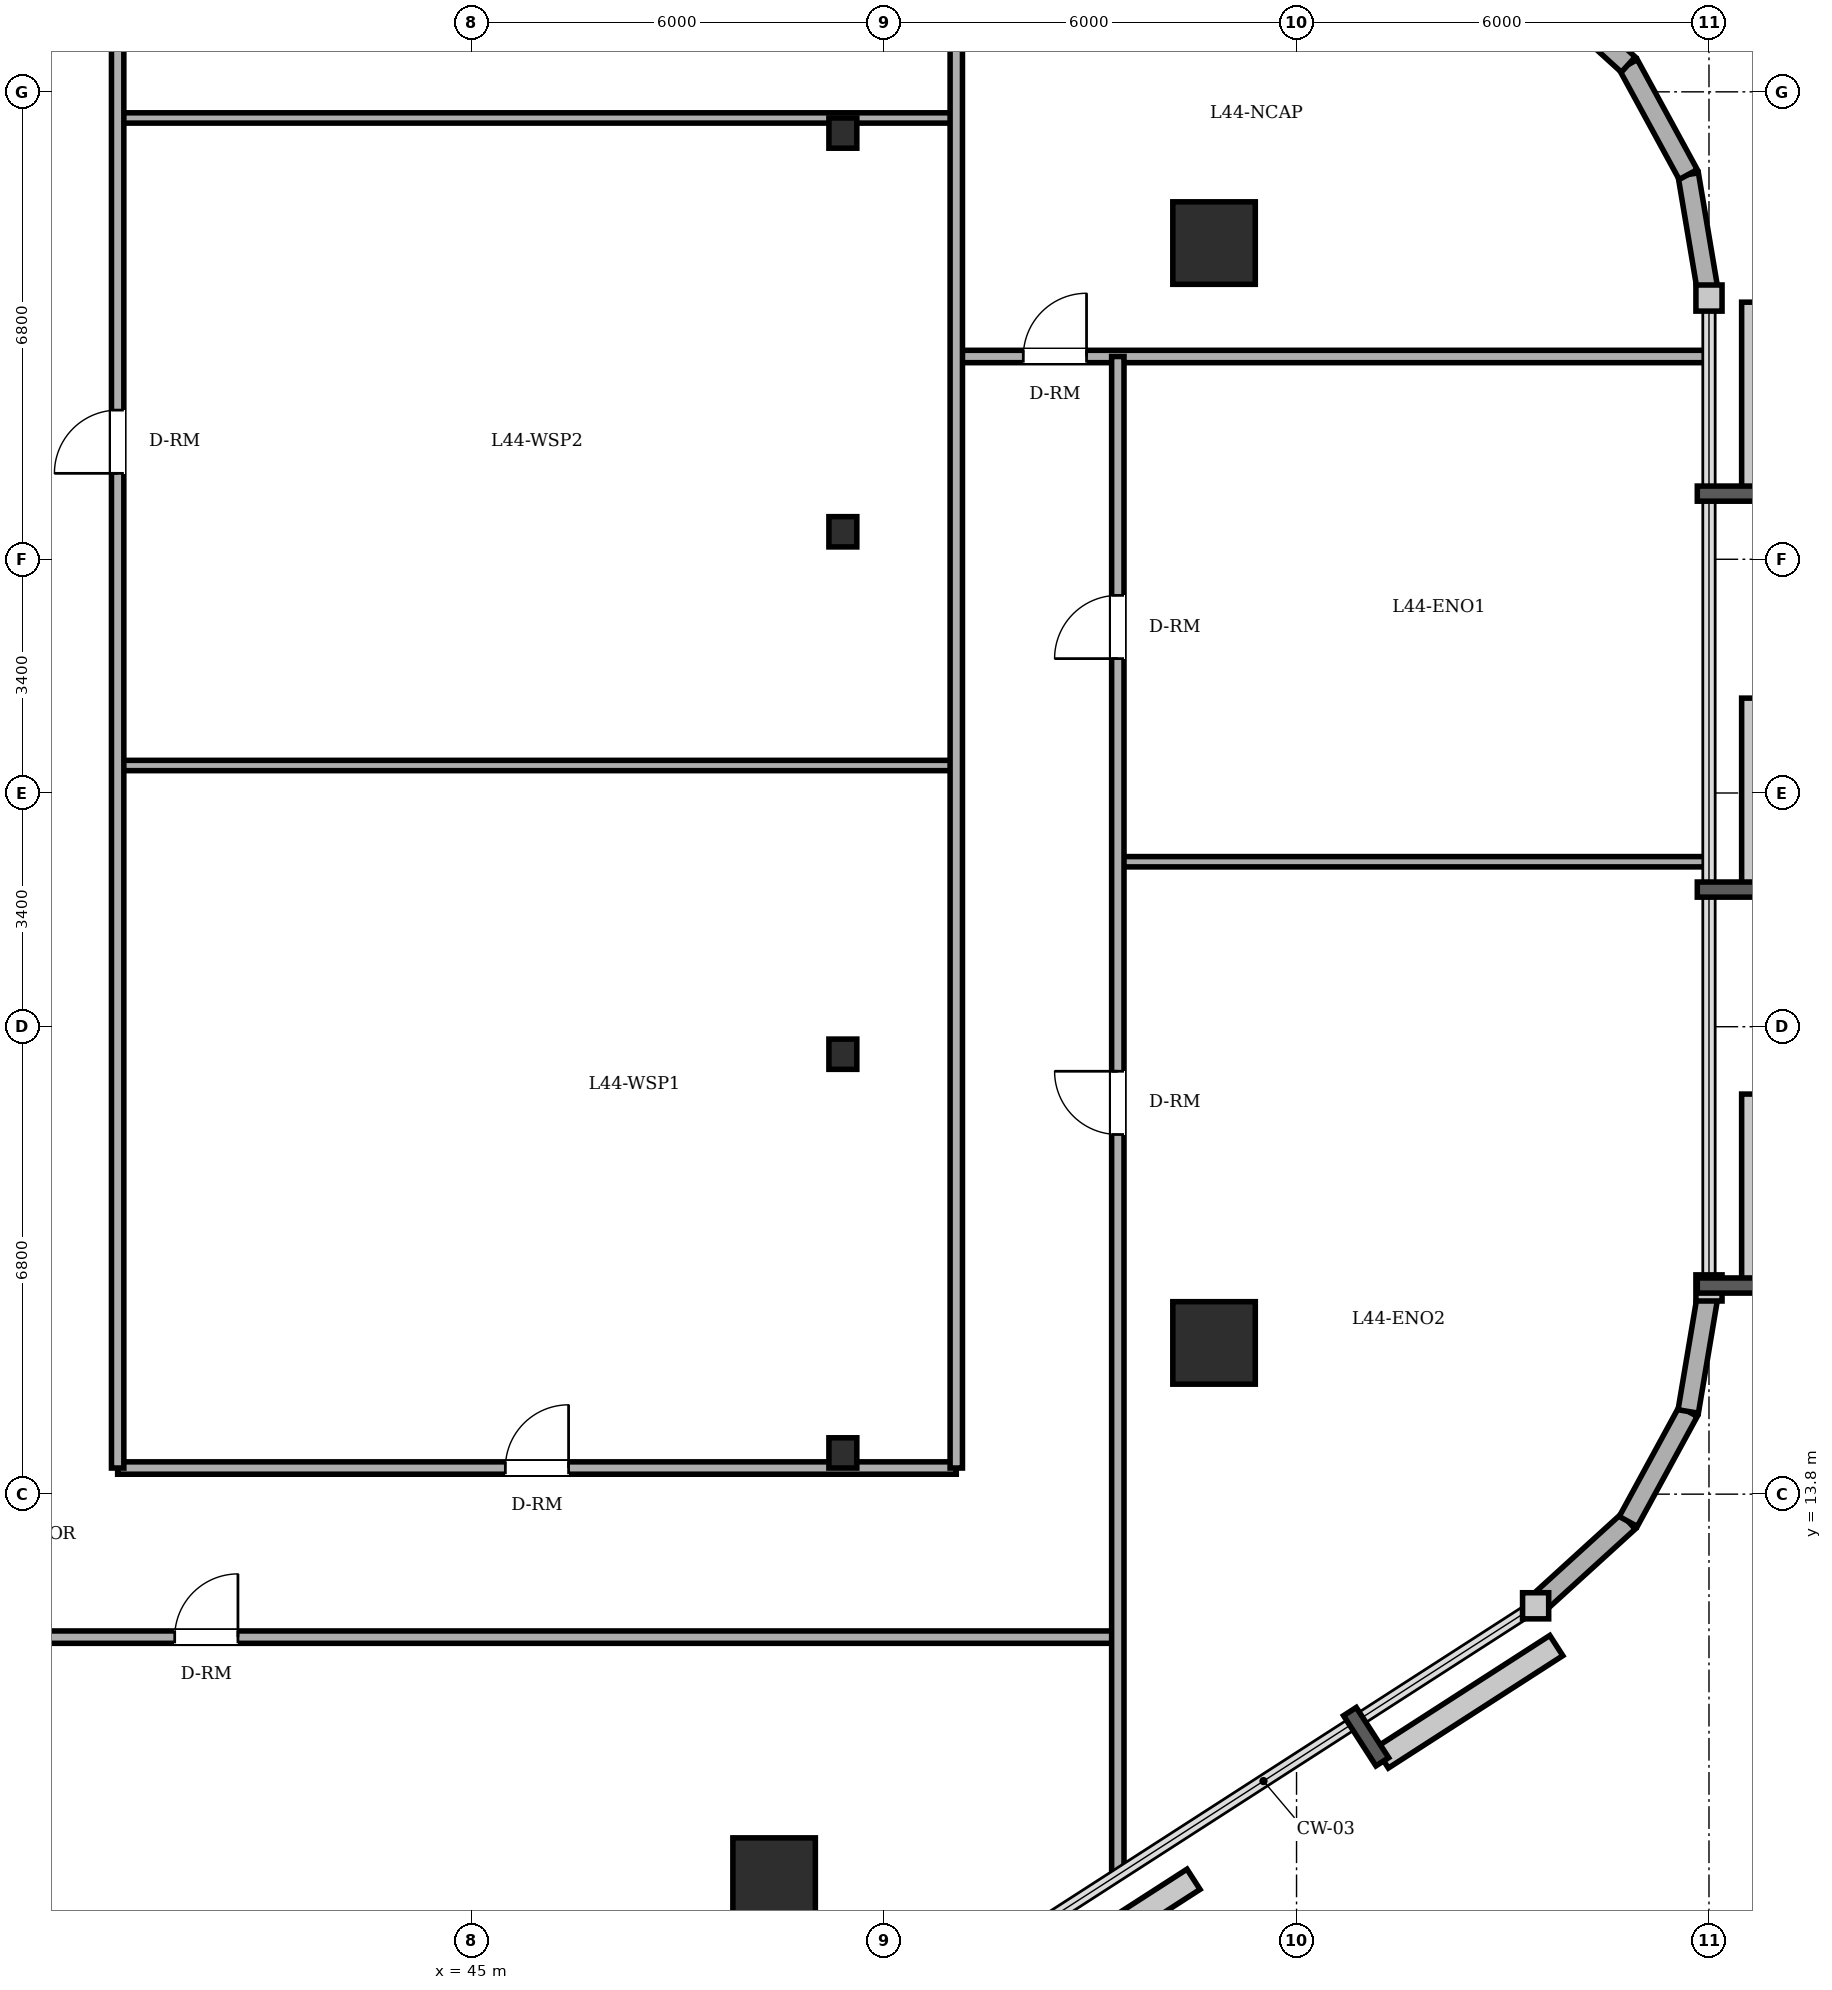
"""IFC4 building model, lengths in metres.
Left out: names, types, materials, properties, quantities, classifications, styles, units other than length and angle.
Written with IfcOpenShell. Run it as: python <this file> out.ifc"""

import sys

from ifc_helpers import new_model, si_unit, direction, frame, frame_2d, origin, origin_2d, place, context, subcontext, project, spatial, rectangle, circle, i_section, extrude, element, fill, save


model = new_model("IFC4")
c1 = context("Model", 3, precision=1e-05, world=origin(), true_north=direction((0.0, 1.0)))
c2 = subcontext(c1, "Body", "Model", "MODEL_VIEW")
j1 = project(units=[si_unit("LENGTHUNIT", "METRE"), si_unit("PLANEANGLEUNIT", "RADIAN")], contexts=[c1])
p1 = place(None, origin())
s1 = spatial("IfcSite", under=j1, at=p1, CompositionType="ELEMENT")
p2 = place(p1, origin())
s2 = spatial("IfcBuilding", under=s1, at=p2, CompositionType="ELEMENT")
p3 = place(p2, frame((0.0, 0.0, 169.0)))
s3 = spatial("IfcBuildingStorey", under=s2, at=p3, CompositionType="ELEMENT", Elevation=169.0)
for number, where, z_axis, x_axis in (
    (1, (49.4, 8.2, 0.0), (0.0, 0.0, 1.0), (1.0, 0.0, 0.0)),
    (2, (55.8, 16.0, 0.0), (0.0, 0.0, 1.0), (1.0, 0.0, 0.0)),
    (3, (55.8, 32.0, 0.0), (0.0, 0.0, 1.0), (1.0, 0.0, 0.0)),
):
    element("IfcColumn", number, at=place(p3, frame(where, z_axis=z_axis, x_axis=x_axis)), inside=s3, PredefinedType="COLUMN", context=c2, shape_type="SweptSolid", body=[
        extrude(circle(Radius=0.6, at=origin_2d()), origin(), (0.0, 0.0, 1.0), 3.6),
    ])
for number, where, z_axis, x_axis in (
    (4, (50.4, 14.4, 0.0), (0.0, 0.0, 1.0), (1.0, 0.0, 0.0)),
    (5, (50.4, 20.2, 0.0), (0.0, 0.0, 1.0), (1.0, 0.0, 0.0)),
    (6, (50.4, 27.8, 0.0), (0.0, 0.0, 1.0), (1.0, 0.0, 0.0)),
    (7, (50.4, 33.6, 0.0), (0.0, 0.0, 1.0), (1.0, 0.0, 0.0)),
):
    element("IfcColumn", number, at=place(p3, frame(where, z_axis=z_axis, x_axis=x_axis)), inside=s3, PredefinedType="COLUMN", context=c2, shape_type="SweptSolid", body=[
        extrude(i_section(OverallWidth=0.406, OverallDepth=0.44, WebThickness=0.024, FlangeThickness=0.039, FilletRadius=0.015, at=origin_2d()), origin(), (0.0, 0.0, 1.0), 3.6),
    ])
p4 = place(p3, frame((60.478, 12.176, 0.0), z_axis=(0.0, 0.0, 1.0), x_axis=(0.73947929393, 0.673179302897, 0.0)))
e8 = element("IfcWall", 8, at=p4, inside=s3, PredefinedType="SOLIDWALL", context=c2, shape_type="SweptSolid", body=[
    extrude(rectangle(XDim=1.823, YDim=0.3, at=frame_2d((0.911, 0.0))), origin(), (0.0, 0.0, 1.0), 3.4),
])
p5 = place(p3, frame((61.826, 13.403, 0.0), z_axis=(0.0, 0.0, 1.0), x_axis=(0.478608030646, 0.878028674362, 0.0)))
e9 = element("IfcWall", 9, at=p5, inside=s3, PredefinedType="SOLIDWALL", context=c2, shape_type="SweptSolid", body=[
    extrude(rectangle(XDim=1.822, YDim=0.3, at=frame_2d((0.911, 0.0))), origin(), (0.0, 0.0, 1.0), 3.4),
])
for number, where, z_axis, x_axis in (
    (10, (62.698, 15.003, 0.0), (0.0, 0.0, 1.0), (0.166, 0.986, 0.0)),
    (11, (63.0, 31.2, 0.0), (0.0, 0.0, 1.0), (-0.166, 0.986, 0.0)),
):
    element("IfcWall", number, at=place(p3, frame(where, z_axis=z_axis, x_axis=x_axis)), inside=s3, PredefinedType="SOLIDWALL", context=c2, shape_type="SweptSolid", body=[
        extrude(rectangle(XDim=1.822, YDim=0.3, at=frame_2d((0.911, 0.0))), origin(), (0.0, 0.0, 1.0), 3.4),
    ])
p6 = place(p3, frame((62.698, 32.997, 0.0), z_axis=(0.0, 0.0, 1.0), x_axis=(-0.478608030646, 0.878028674362, 0.0)))
e12 = element("IfcWall", 12, at=p6, inside=s3, PredefinedType="SOLIDWALL", context=c2, shape_type="SweptSolid", body=[
    extrude(rectangle(XDim=1.822, YDim=0.3, at=frame_2d((0.911, 0.0))), origin(), (0.0, 0.0, 1.0), 3.4),
])
p7 = place(p3, frame((61.826, 34.597, 0.0), z_axis=(0.0, 0.0, 1.0), x_axis=(-0.73947929393, 0.673179302897, 0.0)))
e13 = element("IfcWall", 13, at=p7, inside=s3, PredefinedType="SOLIDWALL", context=c2, shape_type="SweptSolid", body=[
    extrude(rectangle(XDim=1.823, YDim=0.3, at=frame_2d((0.911, 0.0))), origin(), (0.0, 0.0, 1.0), 3.4),
])
p8 = place(p3, frame((13.8, 11.72, 0.0), z_axis=(0.0, 0.0, 1.0), x_axis=(1.0, 0.0, 0.0)))
e14 = element("IfcWall", 14, at=p8, inside=s3, PredefinedType="PARTITIONING", context=c2, shape_type="SweptSolid", body=[
    extrude(rectangle(XDim=40.6, YDim=0.18, at=frame_2d((20.3, 0.0))), origin(), (0.0, 0.0, 1.0), 3.4),
])
p9 = place(p8, frame((12.24, 0.0, 0.0)))
e15 = element("IfcOpeningElement", 15, at=p9, cuts=e14, PredefinedType="OPENING", context=c2, shape_type="SweptSolid", body=[
    extrude(rectangle(XDim=0.92, YDim=2.1, at=frame_2d((0.46, 1.05))), frame((0.0, 0.1, 0.0), z_axis=(0.0, -1.0, 0.0), x_axis=(1.0, 0.0, 0.0)), (0.0, 0.0, 1.0), 0.2),
])
p10 = place(p8, frame((5.54, 0.0, 0.0)))
e16 = element("IfcOpeningElement", 16, at=p10, cuts=e14, PredefinedType="OPENING", context=c2, shape_type="SweptSolid", body=[
    extrude(rectangle(XDim=0.92, YDim=2.1, at=frame_2d((0.46, 1.05))), frame((0.0, 0.1, 0.0), z_axis=(0.0, -1.0, 0.0), x_axis=(1.0, 0.0, 0.0)), (0.0, 0.0, 1.0), 0.2),
])
p11 = place(p8, frame((26.88, 0.0, 0.0)))
e17 = element("IfcOpeningElement", 17, at=p11, cuts=e14, PredefinedType="OPENING", context=c2, shape_type="SweptSolid", body=[
    extrude(rectangle(XDim=0.92, YDim=2.1, at=frame_2d((0.46, 1.05))), frame((0.0, 0.1, 0.0), z_axis=(0.0, -1.0, 0.0), x_axis=(1.0, 0.0, 0.0)), (0.0, 0.0, 1.0), 0.2),
])
p12 = place(p3, frame((39.85, 14.18, 0.0), z_axis=(0.0, 0.0, 1.0), x_axis=(1.0, 0.0, 0.0)))
e18 = element("IfcWall", 18, at=p12, inside=s3, PredefinedType="PARTITIONING", context=c2, shape_type="SweptSolid", body=[
    extrude(rectangle(XDim=12.2, YDim=0.18, at=frame_2d((6.1, 0.0))), origin(), (0.0, 0.0, 1.0), 2.932),
])
p13 = place(p12, frame((5.64, 0.0, 0.0)))
e19 = element("IfcOpeningElement", 19, at=p13, cuts=e18, PredefinedType="OPENING", context=c2, shape_type="SweptSolid", body=[
    extrude(rectangle(XDim=0.92, YDim=2.1, at=frame_2d((0.46, 1.05))), frame((0.0, 0.1, 0.0), z_axis=(0.0, -1.0, 0.0), x_axis=(1.0, 0.0, 0.0)), (0.0, 0.0, 1.0), 0.2),
])
p14 = place(p3, frame((54.4, 23.0, 0.0), z_axis=(0.0, 0.0, 1.0), x_axis=(1.0, 0.0, 0.0)))
e20 = element("IfcWall", 20, at=p14, inside=s3, PredefinedType="PARTITIONING", context=c2, shape_type="SweptSolid", body=[
    extrude(rectangle(XDim=8.6, YDim=0.15, at=frame_2d((4.3, 0.0))), origin(), (0.0, 0.0, 1.0), 3.4),
])
p15 = place(p3, frame((39.85, 24.4, 0.0), z_axis=(0.0, 0.0, 1.0), x_axis=(1.0, 0.0, 0.0)))
e21 = element("IfcWall", 21, at=p15, inside=s3, PredefinedType="PARTITIONING", context=c2, shape_type="SweptSolid", body=[
    extrude(rectangle(XDim=12.2, YDim=0.15, at=frame_2d((6.1, 0.0))), origin(), (0.0, 0.0, 1.0), 3.4),
])
p16 = place(p3, frame((52.05, 30.35, 0.0), z_axis=(0.0, 0.0, 1.0), x_axis=(1.0, 0.0, 0.0)))
e22 = element("IfcWall", 22, at=p16, inside=s3, PredefinedType="PARTITIONING", context=c2, shape_type="SweptSolid", body=[
    extrude(rectangle(XDim=10.95, YDim=0.18, at=frame_2d((5.475, 0.0))), origin(), (0.0, 0.0, 1.0), 3.4),
])
p17 = place(p16, frame((0.975, 0.0, 0.0)))
e23 = element("IfcOpeningElement", 23, at=p17, cuts=e22, PredefinedType="OPENING", context=c2, shape_type="SweptSolid", body=[
    extrude(rectangle(XDim=0.92, YDim=2.1, at=frame_2d((0.46, 1.05))), frame((0.0, 0.1, 0.0), z_axis=(0.0, -1.0, 0.0), x_axis=(1.0, 0.0, 0.0)), (0.0, 0.0, 1.0), 0.2),
])
p18 = place(p3, frame((39.85, 33.82, 0.0), z_axis=(0.0, 0.0, 1.0), x_axis=(1.0, 0.0, 0.0)))
e24 = element("IfcWall", 24, at=p18, inside=s3, PredefinedType="PARTITIONING", context=c2, shape_type="SweptSolid", body=[
    extrude(rectangle(XDim=12.2, YDim=0.15, at=frame_2d((6.1, 0.0))), origin(), (0.0, 0.0, 1.0), 2.932),
])
p19 = place(p3, frame((39.85, 14.18, 0.0), z_axis=(0.0, 0.0, 1.0), x_axis=(0.0, 1.0, 0.0)))
e25 = element("IfcWall", 25, at=p19, inside=s3, PredefinedType="PARTITIONING", context=c2, shape_type="SweptSolid", body=[
    extrude(rectangle(XDim=27.62, YDim=0.18, at=frame_2d((13.81, 0.0))), origin(), (0.0, 0.0, 1.0), 3.4),
])
p20 = place(p19, frame((14.47, 0.0, 0.0)))
e26 = element("IfcOpeningElement", 26, at=p20, cuts=e25, PredefinedType="OPENING", context=c2, shape_type="SweptSolid", body=[
    extrude(rectangle(XDim=0.92, YDim=2.1, at=frame_2d((0.46, 1.05))), frame((0.0, 0.1, 0.0), z_axis=(0.0, -1.0, 0.0), x_axis=(1.0, 0.0, 0.0)), (0.0, 0.0, 1.0), 0.2),
])
p21 = place(p3, frame((52.05, 14.18, 0.0), z_axis=(0.0, 0.0, 1.0), x_axis=(0.0, 1.0, 0.0)))
e27 = element("IfcWall", 27, at=p21, inside=s3, PredefinedType="PARTITIONING", context=c2, shape_type="SweptSolid", body=[
    extrude(rectangle(XDim=27.008, YDim=0.18, at=frame_2d((13.504, 0.0))), origin(), (0.0, 0.0, 1.0), 3.4),
])
p22 = place(p3, frame((54.4, 8.261, 0.0), z_axis=(0.0, 0.0, 1.0), x_axis=(0.0, 1.0, 0.0)))
e28 = element("IfcWall", 28, at=p22, inside=s3, PredefinedType="PARTITIONING", context=c2, shape_type="SweptSolid", body=[
    extrude(rectangle(XDim=22.089, YDim=0.18, at=frame_2d((11.044, 0.0))), origin(), (0.0, 0.0, 1.0), 3.4),
])
p23 = place(p22, frame((17.694, 0.0, 0.0)))
e29 = element("IfcOpeningElement", 29, at=p23, cuts=e28, PredefinedType="OPENING", context=c2, shape_type="SweptSolid", body=[
    extrude(rectangle(XDim=0.92, YDim=2.1, at=frame_2d((0.46, 1.05))), frame((0.0, 0.1, 0.0), z_axis=(0.0, -1.0, 0.0), x_axis=(1.0, 0.0, 0.0)), (0.0, 0.0, 1.0), 0.2),
])
p24 = place(p22, frame((10.771, 0.0, 0.0)))
e30 = element("IfcOpeningElement", 30, at=p24, cuts=e28, PredefinedType="OPENING", context=c2, shape_type="SweptSolid", body=[
    extrude(rectangle(XDim=0.92, YDim=2.1, at=frame_2d((0.46, 1.05))), frame((0.0, 0.1, 0.0), z_axis=(0.0, -1.0, 0.0), x_axis=(1.0, 0.0, 0.0)), (0.0, 0.0, 1.0), 0.2),
])
p25 = place(p13, origin())
e31 = element("IfcDoor", 31, at=p25, inside=s3, OperationType="SINGLE_SWING_RIGHT", PredefinedType="DOOR", context=c2, shape_type="SweptSolid", body=[
    extrude(rectangle(XDim=0.92, YDim=2.1, at=frame_2d((0.46, 1.05))), frame((0.0, 0.025, 0.0), z_axis=(0.0, -1.0, 0.0), x_axis=(1.0, 0.0, 0.0)), (0.0, 0.0, 1.0), 0.05),
])
fill(e19, e31)
p26 = place(p20, origin())
e32 = element("IfcDoor", 32, at=p26, inside=s3, OperationType="SINGLE_SWING_LEFT", PredefinedType="DOOR", context=c2, shape_type="SweptSolid", body=[
    extrude(rectangle(XDim=0.92, YDim=2.1, at=frame_2d((0.46, 1.05))), frame((0.0, 0.025, 0.0), z_axis=(0.0, -1.0, 0.0), x_axis=(1.0, 0.0, 0.0)), (0.0, 0.0, 1.0), 0.05),
])
fill(e26, e32)
p27 = place(p17, origin())
e33 = element("IfcDoor", 33, at=p27, inside=s3, OperationType="SINGLE_SWING_RIGHT", PredefinedType="DOOR", context=c2, shape_type="SweptSolid", body=[
    extrude(rectangle(XDim=0.92, YDim=2.1, at=frame_2d((0.46, 1.05))), frame((0.0, 0.025, 0.0), z_axis=(0.0, -1.0, 0.0), x_axis=(1.0, 0.0, 0.0)), (0.0, 0.0, 1.0), 0.05),
])
fill(e23, e33)
p28 = place(p23, origin())
e34 = element("IfcDoor", 34, at=p28, inside=s3, OperationType="SINGLE_SWING_LEFT", PredefinedType="DOOR", context=c2, shape_type="SweptSolid", body=[
    extrude(rectangle(XDim=0.92, YDim=2.1, at=frame_2d((0.46, 1.05))), frame((0.0, 0.025, 0.0), z_axis=(0.0, -1.0, 0.0), x_axis=(1.0, 0.0, 0.0)), (0.0, 0.0, 1.0), 0.05),
])
fill(e29, e34)
p29 = place(p24, origin())
e35 = element("IfcDoor", 35, at=p29, inside=s3, OperationType="SINGLE_SWING_RIGHT", PredefinedType="DOOR", context=c2, shape_type="SweptSolid", body=[
    extrude(rectangle(XDim=0.92, YDim=2.1, at=frame_2d((0.46, 1.05))), frame((0.0, 0.025, 0.0), z_axis=(0.0, -1.0, 0.0), x_axis=(1.0, 0.0, 0.0)), (0.0, 0.0, 1.0), 0.05),
])
fill(e30, e35)
p30 = place(p11, origin())
e36 = element("IfcDoor", 36, at=p30, inside=s3, OperationType="SINGLE_SWING_RIGHT", PredefinedType="DOOR", context=c2, shape_type="SweptSolid", body=[
    extrude(rectangle(XDim=0.92, YDim=2.1, at=frame_2d((0.46, 1.05))), frame((0.0, 0.025, 0.0), z_axis=(0.0, -1.0, 0.0), x_axis=(1.0, 0.0, 0.0)), (0.0, 0.0, 1.0), 0.05),
])
fill(e17, e36)
save(model, sys.argv[1])
